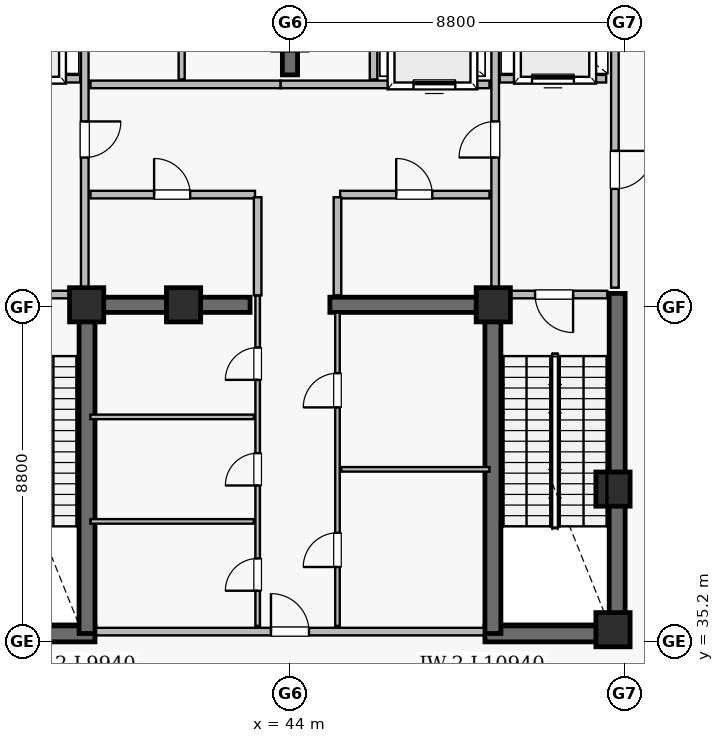
"""IFC4 building model, lengths in metres.
Left out: names, types, materials, properties, quantities, classifications, styles, units other than length and angle.
Written with IfcOpenShell. Run it as: python <this file> out.ifc"""

import sys

from ifc_helpers import new_model, si_unit, direction, frame, frame_2d, origin, origin_2d, place, context, subcontext, project, spatial, rectangle, extrude, element, fill, save


model = new_model("IFC4")
c1 = context("Model", 3, precision=1e-05, world=origin(), true_north=direction((0.0, 1.0)))
c2 = subcontext(c1, "Body", "Model", "MODEL_VIEW")
j1 = project(units=[si_unit("LENGTHUNIT", "METRE"), si_unit("PLANEANGLEUNIT", "RADIAN")], contexts=[c1])
p1 = place(None, origin())
s1 = spatial("IfcSite", under=j1, at=p1, CompositionType="ELEMENT")
p2 = place(p1, origin())
s2 = spatial("IfcBuilding", under=s1, at=p2, CompositionType="ELEMENT")
p3 = place(p2, frame((0.0, 0.0, 300.8)))
s3 = spatial("IfcBuildingStorey", under=s2, at=p3, CompositionType="ELEMENT", Elevation=300.8)
for number, where, z_axis, x_axis in (
    (1, (35.18, 35.39, 0.0), (0.0, 0.0, 1.0), (1.0, 0.0, 0.0)),
    (2, (49.13, 35.39, 0.0), (0.0, 0.0, 1.0), (1.0, 0.0, 0.0)),
):
    element("IfcWall", number, at=place(p3, frame(where, z_axis=z_axis, x_axis=x_axis)), inside=s3, PredefinedType="SHEAR", context=c2, shape_type="SweptSolid", body=[
        extrude(rectangle(XDim=3.69, YDim=0.42, at=frame_2d((1.845, 0.0))), origin(), (0.0, 0.0, 1.0), 5.74),
    ])
p4 = place(p3, frame((52.61, 35.18, 0.0), z_axis=(0.0, 0.0, 1.0), x_axis=(0.0, 1.0, 0.0)))
e3 = element("IfcWall", 3, at=p4, inside=s3, PredefinedType="SHEAR", context=c2, shape_type="SweptSolid", body=[
    extrude(rectangle(XDim=9.17, YDim=0.42, at=frame_2d((4.585, 0.0))), origin(), (0.0, 0.0, 1.0), 5.74),
])
for number, where, z_axis, x_axis in (
    (4, (38.66, 35.4, 0.0), (0.0, 0.0, 1.0), (0.0, 1.0, 0.0)),
    (5, (49.34, 35.4, 0.0), (0.0, 0.0, 1.0), (0.0, 1.0, 0.0)),
):
    element("IfcWall", number, at=place(p3, frame(where, z_axis=z_axis, x_axis=x_axis)), inside=s3, PredefinedType="SHEAR", context=c2, shape_type="SweptSolid", body=[
        extrude(rectangle(XDim=8.95, YDim=0.42, at=frame_2d((4.475, 0.0))), origin(), (0.0, 0.0, 1.0), 5.74),
    ])
p5 = place(p3, frame((44.0, 50.1, 0.0), z_axis=(0.0, 0.0, 1.0), x_axis=(0.0, 1.0, 0.0)))
e6 = element("IfcWall", 6, at=p5, inside=s3, PredefinedType="SHEAR", context=c2, shape_type="SweptSolid", body=[
    extrude(rectangle(XDim=2.1, YDim=0.4, at=frame_2d((1.05, 0.0))), origin(), (0.0, 0.0, 1.0), 5.74),
])
for number, where, z_axis, x_axis in (
    (7, (38.75, 44.05, 0.0), (0.0, 0.0, 1.0), (1.0, 0.0, 0.0)),
    (8, (45.05, 44.05, 0.0), (0.0, 0.0, 1.0), (1.0, 0.0, 0.0)),
):
    element("IfcWall", number, at=place(p3, frame(where, z_axis=z_axis, x_axis=x_axis)), inside=s3, PredefinedType="SHEAR", context=c2, shape_type="SweptSolid", body=[
        extrude(rectangle(XDim=4.2, YDim=0.4, at=frame_2d((2.1, 0.0))), origin(), (0.0, 0.0, 1.0), 5.74),
    ])
for number, where, z_axis, x_axis in (
    (9, (38.65, 44.05, 0.0), (0.0, 0.0, 1.0), (1.0, 0.0, 0.0)),
    (10, (52.5, 35.5, 0.0), (0.0, 0.0, 1.0), (1.0, 0.0, 0.0)),
    (11, (52.5, 39.2, 0.0), (0.0, 0.0, 1.0), (1.0, 0.0, 0.0)),
    (12, (49.35, 44.05, 0.0), (0.0, 0.0, 1.0), (1.0, 0.0, 0.0)),
    (13, (41.2, 44.05, 0.0), (0.0, 0.0, 1.0), (1.0, 0.0, 0.0)),
):
    element("IfcColumn", number, at=place(p3, frame(where, z_axis=z_axis, x_axis=x_axis)), inside=s3, PredefinedType="COLUMN", context=c2, shape_type="SweptSolid", body=[
        extrude(rectangle(XDim=0.9, YDim=0.9, at=origin_2d()), origin(), (0.0, 0.0, 1.0), 6.0),
    ])
p6 = place(p3, frame((38.9, 35.45, 0.0), z_axis=(0.0, 0.0, 1.0), x_axis=(1.0, 0.0, 0.0)))
e14 = element("IfcWall", 14, at=p6, inside=s3, PredefinedType="SOLIDWALL", context=c2, shape_type="SweptSolid", body=[
    extrude(rectangle(XDim=10.2, YDim=0.2, at=frame_2d((5.1, 0.0))), origin(), (0.0, 0.0, 1.0), 5.74),
])
p7 = place(p6, frame((4.6, 0.0, 0.0)))
e15 = element("IfcOpeningElement", 15, at=p7, cuts=e14, PredefinedType="OPENING", context=c2, shape_type="SweptSolid", body=[
    extrude(rectangle(XDim=1.0, YDim=2.15, at=frame_2d((0.5, 1.075))), frame((0.0, 0.11, 0.0), z_axis=(0.0, -1.0, 0.0), x_axis=(1.0, 0.0, 0.0)), (0.0, 0.0, 1.0), 0.22),
])
p8 = place(p3, frame((43.15, 35.6, 0.0), z_axis=(0.0, 0.0, 1.0), x_axis=(0.0, 1.0, 0.0)))
e16 = element("IfcWall", 16, at=p8, inside=s3, PredefinedType="PARTITIONING", context=c2, shape_type="SweptSolid", body=[
    extrude(rectangle(XDim=8.7, YDim=0.12, at=frame_2d((4.35, 0.0))), origin(), (0.0, 0.0, 1.0), 5.74),
])
p9 = place(p8, frame((0.925, 0.0, 0.0)))
e17 = element("IfcOpeningElement", 17, at=p9, cuts=e16, PredefinedType="OPENING", context=c2, shape_type="SweptSolid", body=[
    extrude(rectangle(XDim=0.85, YDim=2.1, at=frame_2d((0.425, 1.05))), frame((0.0, 0.07, 0.0), z_axis=(0.0, -1.0, 0.0), x_axis=(1.0, 0.0, 0.0)), (0.0, 0.0, 1.0), 0.14),
])
p10 = place(p8, frame((3.695, 0.0, 0.0)))
e18 = element("IfcOpeningElement", 18, at=p10, cuts=e16, PredefinedType="OPENING", context=c2, shape_type="SweptSolid", body=[
    extrude(rectangle(XDim=0.85, YDim=2.1, at=frame_2d((0.425, 1.05))), frame((0.0, 0.07, 0.0), z_axis=(0.0, -1.0, 0.0), x_axis=(1.0, 0.0, 0.0)), (0.0, 0.0, 1.0), 0.14),
])
p11 = place(p8, frame((6.475, 0.0, 0.0)))
e19 = element("IfcOpeningElement", 19, at=p11, cuts=e16, PredefinedType="OPENING", context=c2, shape_type="SweptSolid", body=[
    extrude(rectangle(XDim=0.85, YDim=2.1, at=frame_2d((0.425, 1.05))), frame((0.0, 0.07, 0.0), z_axis=(0.0, -1.0, 0.0), x_axis=(1.0, 0.0, 0.0)), (0.0, 0.0, 1.0), 0.14),
])
p12 = place(p3, frame((45.25, 35.6, 0.0), z_axis=(0.0, 0.0, 1.0), x_axis=(0.0, 1.0, 0.0)))
e20 = element("IfcWall", 20, at=p12, inside=s3, PredefinedType="PARTITIONING", context=c2, shape_type="SweptSolid", body=[
    extrude(rectangle(XDim=8.25, YDim=0.12, at=frame_2d((4.125, 0.0))), origin(), (0.0, 0.0, 1.0), 5.74),
])
p13 = place(p12, frame((1.55, 0.0, 0.0)))
e21 = element("IfcOpeningElement", 21, at=p13, cuts=e20, PredefinedType="OPENING", context=c2, shape_type="SweptSolid", body=[
    extrude(rectangle(XDim=0.9, YDim=2.1, at=frame_2d((0.45, 1.05))), frame((0.0, 0.07, 0.0), z_axis=(0.0, -1.0, 0.0), x_axis=(1.0, 0.0, 0.0)), (0.0, 0.0, 1.0), 0.14),
])
p14 = place(p12, frame((5.75, 0.0, 0.0)))
e22 = element("IfcOpeningElement", 22, at=p14, cuts=e20, PredefinedType="OPENING", context=c2, shape_type="SweptSolid", body=[
    extrude(rectangle(XDim=0.9, YDim=2.1, at=frame_2d((0.45, 1.05))), frame((0.0, 0.07, 0.0), z_axis=(0.0, -1.0, 0.0), x_axis=(1.0, 0.0, 0.0)), (0.0, 0.0, 1.0), 0.14),
])
p15 = place(p3, frame((52.55, 44.5, 0.0), z_axis=(0.0, 0.0, 1.0), x_axis=(0.0, 1.0, 0.0)))
e23 = element("IfcWall", 23, at=p15, inside=s3, PredefinedType="SOLIDWALL", context=c2, shape_type="SweptSolid", body=[
    extrude(rectangle(XDim=7.92, YDim=0.2, at=frame_2d((3.96, 0.0))), origin(), (0.0, 0.0, 1.0), 5.74),
])
p16 = place(p15, frame((2.6, 0.0, 0.0)))
e24 = element("IfcOpeningElement", 24, at=p16, cuts=e23, PredefinedType="OPENING", context=c2, shape_type="SweptSolid", body=[
    extrude(rectangle(XDim=1.0, YDim=2.15, at=frame_2d((0.5, 1.075))), frame((0.0, 0.11, 0.0), z_axis=(0.0, -1.0, 0.0), x_axis=(1.0, 0.0, 0.0)), (0.0, 0.0, 1.0), 0.22),
])
p17 = place(p3, frame((38.6, 44.5, 0.0), z_axis=(0.0, 0.0, 1.0), x_axis=(0.0, 1.0, 0.0)))
e25 = element("IfcWall", 25, at=p17, inside=s3, PredefinedType="SOLIDWALL", context=c2, shape_type="SweptSolid", body=[
    extrude(rectangle(XDim=7.92, YDim=0.2, at=frame_2d((3.96, 0.0))), origin(), (0.0, 0.0, 1.0), 5.74),
])
p18 = place(p17, frame((3.425, 0.0, 0.0)))
e26 = element("IfcOpeningElement", 26, at=p18, cuts=e25, PredefinedType="OPENING", context=c2, shape_type="SweptSolid", body=[
    extrude(rectangle(XDim=0.95, YDim=2.15, at=frame_2d((0.475, 1.075))), frame((0.0, 0.11, 0.0), z_axis=(0.0, -1.0, 0.0), x_axis=(1.0, 0.0, 0.0)), (0.0, 0.0, 1.0), 0.22),
])
p19 = place(p3, frame((49.4, 44.5, 0.0), z_axis=(0.0, 0.0, 1.0), x_axis=(0.0, 1.0, 0.0)))
e27 = element("IfcWall", 27, at=p19, inside=s3, PredefinedType="SOLIDWALL", context=c2, shape_type="SweptSolid", body=[
    extrude(rectangle(XDim=7.92, YDim=0.2, at=frame_2d((3.96, 0.0))), origin(), (0.0, 0.0, 1.0), 4.828),
])
p20 = place(p19, frame((3.425, 0.0, 0.0)))
e28 = element("IfcOpeningElement", 28, at=p20, cuts=e27, PredefinedType="OPENING", context=c2, shape_type="SweptSolid", body=[
    extrude(rectangle(XDim=0.95, YDim=2.15, at=frame_2d((0.475, 1.075))), frame((0.0, 0.11, 0.0), z_axis=(0.0, -1.0, 0.0), x_axis=(1.0, 0.0, 0.0)), (0.0, 0.0, 1.0), 0.22),
])
p21 = place(p3, frame((43.75, 49.85, 0.0), z_axis=(0.0, 0.0, 1.0), x_axis=(1.0, 0.0, 0.0)))
e29 = element("IfcWall", 29, at=p21, inside=s3, PredefinedType="SOLIDWALL", context=c2, shape_type="SweptSolid", body=[
    extrude(rectangle(XDim=5.5, YDim=0.2, at=frame_2d((2.75, 0.0))), origin(), (0.0, 0.0, 1.0), 4.828),
])
p22 = place(p21, frame((3.5, 0.0, 0.0)))
e30 = element("IfcOpeningElement", 30, at=p22, cuts=e29, PredefinedType="OPENING", context=c2, shape_type="SweptSolid", body=[
    extrude(rectangle(XDim=1.1, YDim=2.15, at=frame_2d((0.55, 1.075))), frame((0.0, 0.11, 0.0), z_axis=(0.0, -1.0, 0.0), x_axis=(1.0, 0.0, 0.0)), (0.0, 0.0, 1.0), 0.22),
])
p23 = place(p3, frame((38.75, 46.95, 0.0), z_axis=(0.0, 0.0, 1.0), x_axis=(1.0, 0.0, 0.0)))
e31 = element("IfcWall", 31, at=p23, inside=s3, PredefinedType="SOLIDWALL", context=c2, shape_type="SweptSolid", body=[
    extrude(rectangle(XDim=4.33, YDim=0.2, at=frame_2d((2.165, 0.0))), origin(), (0.0, 0.0, 1.0), 5.74),
])
p24 = place(p23, frame((1.675, 0.0, 0.0)))
e32 = element("IfcOpeningElement", 32, at=p24, cuts=e31, PredefinedType="OPENING", context=c2, shape_type="SweptSolid", body=[
    extrude(rectangle(XDim=0.95, YDim=2.1, at=frame_2d((0.475, 1.05))), frame((0.0, 0.11, 0.0), z_axis=(0.0, -1.0, 0.0), x_axis=(1.0, 0.0, 0.0)), (0.0, 0.0, 1.0), 0.22),
])
p25 = place(p3, frame((45.32, 46.95, 0.0), z_axis=(0.0, 0.0, 1.0), x_axis=(1.0, 0.0, 0.0)))
e33 = element("IfcWall", 33, at=p25, inside=s3, PredefinedType="SOLIDWALL", context=c2, shape_type="SweptSolid", body=[
    extrude(rectangle(XDim=3.93, YDim=0.2, at=frame_2d((1.965, 0.0))), origin(), (0.0, 0.0, 1.0), 4.828),
])
p26 = place(p25, frame((1.475, 0.0, 0.0)))
e34 = element("IfcOpeningElement", 34, at=p26, cuts=e33, PredefinedType="OPENING", context=c2, shape_type="SweptSolid", body=[
    extrude(rectangle(XDim=0.95, YDim=2.1, at=frame_2d((0.475, 1.05))), frame((0.0, 0.11, 0.0), z_axis=(0.0, -1.0, 0.0), x_axis=(1.0, 0.0, 0.0)), (0.0, 0.0, 1.0), 0.22),
])
p27 = place(p3, frame((35.65, 44.32, 0.0), z_axis=(0.0, 0.0, 1.0), x_axis=(1.0, 0.0, 0.0)))
e35 = element("IfcWall", 35, at=p27, inside=s3, PredefinedType="SOLIDWALL", context=c2, shape_type="SweptSolid", body=[
    extrude(rectangle(XDim=2.8, YDim=0.2, at=frame_2d((1.4, 0.0))), origin(), (0.0, 0.0, 1.0), 5.74),
])
p28 = place(p27, frame((0.9, 0.0, 0.0)))
e36 = element("IfcOpeningElement", 36, at=p28, cuts=e35, PredefinedType="OPENING", context=c2, shape_type="SweptSolid", body=[
    extrude(rectangle(XDim=1.0, YDim=2.15, at=frame_2d((0.5, 1.075))), frame((0.0, 0.11, 0.0), z_axis=(0.0, -1.0, 0.0), x_axis=(1.0, 0.0, 0.0)), (0.0, 0.0, 1.0), 0.22),
])
p29 = place(p3, frame((49.55, 44.32, 0.0), z_axis=(0.0, 0.0, 1.0), x_axis=(1.0, 0.0, 0.0)))
e37 = element("IfcWall", 37, at=p29, inside=s3, PredefinedType="SOLIDWALL", context=c2, shape_type="SweptSolid", body=[
    extrude(rectangle(XDim=2.8, YDim=0.2, at=frame_2d((1.4, 0.0))), origin(), (0.0, 0.0, 1.0), 4.828),
])
p30 = place(p29, frame((0.9, 0.0, 0.0)))
e38 = element("IfcOpeningElement", 38, at=p30, cuts=e37, PredefinedType="OPENING", context=c2, shape_type="SweptSolid", body=[
    extrude(rectangle(XDim=1.0, YDim=2.15, at=frame_2d((0.5, 1.075))), frame((0.0, 0.11, 0.0), z_axis=(0.0, -1.0, 0.0), x_axis=(1.0, 0.0, 0.0)), (0.0, 0.0, 1.0), 0.22),
])
p31 = place(p3, frame((35.68, 50.0, 0.0), z_axis=(0.0, 0.0, 1.0), x_axis=(1.0, 0.0, 0.0)))
e39 = element("IfcWall", 39, at=p31, inside=s3, PredefinedType="SOLIDWALL", context=c2, shape_type="SweptSolid", body=[
    extrude(rectangle(XDim=2.8, YDim=0.2, at=frame_2d((1.4, 0.0))), origin(), (0.0, 0.0, 1.0), 5.74),
])
p32 = place(p31, frame((0.85, 0.0, 0.0)))
e40 = element("IfcOpeningElement", 40, at=p32, cuts=e39, PredefinedType="OPENING", context=c2, shape_type="SweptSolid", body=[
    extrude(rectangle(XDim=1.1, YDim=2.15, at=frame_2d((0.55, 1.075))), frame((0.0, 0.11, 0.0), z_axis=(0.0, -1.0, 0.0), x_axis=(1.0, 0.0, 0.0)), (0.0, 0.0, 1.0), 0.22),
])
p33 = place(p3, frame((49.52, 50.0, 0.0), z_axis=(0.0, 0.0, 1.0), x_axis=(1.0, 0.0, 0.0)))
e41 = element("IfcWall", 41, at=p33, inside=s3, PredefinedType="SOLIDWALL", context=c2, shape_type="SweptSolid", body=[
    extrude(rectangle(XDim=2.8, YDim=0.2, at=frame_2d((1.4, 0.0))), origin(), (0.0, 0.0, 1.0), 5.74),
])
p34 = place(p33, frame((0.85, 0.0, 0.0)))
e42 = element("IfcOpeningElement", 42, at=p34, cuts=e41, PredefinedType="OPENING", context=c2, shape_type="SweptSolid", body=[
    extrude(rectangle(XDim=1.1, YDim=2.15, at=frame_2d((0.55, 1.075))), frame((0.0, 0.11, 0.0), z_axis=(0.0, -1.0, 0.0), x_axis=(1.0, 0.0, 0.0)), (0.0, 0.0, 1.0), 0.22),
])
p35 = place(p3, frame((38.75, 49.85, 0.0), z_axis=(0.0, 0.0, 1.0), x_axis=(1.0, 0.0, 0.0)))
e43 = element("IfcWall", 43, at=p35, inside=s3, PredefinedType="SOLIDWALL", context=c2, shape_type="SweptSolid", body=[
    extrude(rectangle(XDim=5.0, YDim=0.2, at=frame_2d((2.5, 0.0))), origin(), (0.0, 0.0, 1.0), 5.74),
])
for number, where, z_axis, x_axis in (
    (44, (38.75, 38.35, 0.0), (0.0, 0.0, 1.0), (1.0, 0.0, 0.0)),
    (45, (38.75, 41.1, 0.0), (0.0, 0.0, 1.0), (1.0, 0.0, 0.0)),
):
    element("IfcWall", number, at=place(p3, frame(where, z_axis=z_axis, x_axis=x_axis)), inside=s3, PredefinedType="PARTITIONING", context=c2, shape_type="SweptSolid", body=[
        extrude(rectangle(XDim=4.3, YDim=0.12, at=frame_2d((2.15, 0.0))), origin(), (0.0, 0.0, 1.0), 5.74),
    ])
p36 = place(p3, frame((45.35, 39.72, 0.0), z_axis=(0.0, 0.0, 1.0), x_axis=(1.0, 0.0, 0.0)))
e46 = element("IfcWall", 46, at=p36, inside=s3, PredefinedType="PARTITIONING", context=c2, shape_type="SweptSolid", body=[
    extrude(rectangle(XDim=3.9, YDim=0.12, at=frame_2d((1.95, 0.0))), origin(), (0.0, 0.0, 1.0), 5.74),
])
for number, where, z_axis, x_axis in (
    (47, (43.15, 44.3, 0.0), (0.0, 0.0, 1.0), (0.0, 1.0, 0.0)),
    (48, (45.25, 44.3, 0.0), (0.0, 0.0, 1.0), (0.0, 1.0, 0.0)),
):
    element("IfcWall", number, at=place(p3, frame(where, z_axis=z_axis, x_axis=x_axis)), inside=s3, PredefinedType="SOLIDWALL", context=c2, shape_type="SweptSolid", body=[
        extrude(rectangle(XDim=2.58, YDim=0.2, at=frame_2d((1.29, 0.0))), origin(), (0.0, 0.0, 1.0), 5.74),
    ])
p37 = place(p3, frame((41.15, 49.98, 0.0), z_axis=(0.0, 0.0, 1.0), x_axis=(0.0, 1.0, 0.0)))
e49 = element("IfcWall", 49, at=p37, inside=s3, PredefinedType="SOLIDWALL", context=c2, shape_type="SweptSolid", body=[
    extrude(rectangle(XDim=2.37, YDim=0.16, at=frame_2d((1.185, 0.0))), origin(), (0.0, 0.0, 1.0), 5.74),
])
p38 = place(p3, frame((46.2, 49.98, 0.0), z_axis=(0.0, 0.0, 1.0), x_axis=(0.0, 1.0, 0.0)))
e50 = element("IfcWall", 50, at=p38, inside=s3, PredefinedType="SOLIDWALL", context=c2, shape_type="SweptSolid", body=[
    extrude(rectangle(XDim=2.37, YDim=0.2, at=frame_2d((1.185, 0.0))), origin(), (0.0, 0.0, 1.0), 5.74),
])
p39 = place(p30, frame((1.0, 0.0, 0.0), z_axis=(0.0, 0.0, 1.0), x_axis=(-1.0, 0.0, 0.0)))
e51 = element("IfcDoor", 51, at=p39, inside=s3, OperationType="SINGLE_SWING_RIGHT", PredefinedType="DOOR", context=c2, shape_type="SweptSolid", body=[
    extrude(rectangle(XDim=1.0, YDim=2.15, at=frame_2d((0.5, 1.075))), frame((0.0, 0.025, 0.0), z_axis=(0.0, -1.0, 0.0), x_axis=(1.0, 0.0, 0.0)), (0.0, 0.0, 1.0), 0.05),
])
fill(e38, e51)
p40 = place(p16, frame((1.0, 0.0, 0.0), z_axis=(0.0, 0.0, 1.0), x_axis=(-1.0, 0.0, 0.0)))
e52 = element("IfcDoor", 52, at=p40, inside=s3, OperationType="SINGLE_SWING_RIGHT", PredefinedType="DOOR", context=c2, shape_type="SweptSolid", body=[
    extrude(rectangle(XDim=1.0, YDim=2.15, at=frame_2d((0.5, 1.075))), frame((0.0, 0.025, 0.0), z_axis=(0.0, -1.0, 0.0), x_axis=(1.0, 0.0, 0.0)), (0.0, 0.0, 1.0), 0.05),
])
fill(e24, e52)
p41 = place(p18, frame((0.95, 0.0, 0.0), z_axis=(0.0, 0.0, 1.0), x_axis=(-1.0, 0.0, 0.0)))
e53 = element("IfcDoor", 53, at=p41, inside=s3, OperationType="SINGLE_SWING_RIGHT", PredefinedType="DOOR", context=c2, shape_type="SweptSolid", body=[
    extrude(rectangle(XDim=0.95, YDim=2.15, at=frame_2d((0.475, 1.075))), frame((0.0, 0.025, 0.0), z_axis=(0.0, -1.0, 0.0), x_axis=(1.0, 0.0, 0.0)), (0.0, 0.0, 1.0), 0.05),
])
fill(e26, e53)
p42 = place(p20, origin())
e54 = element("IfcDoor", 54, at=p42, inside=s3, OperationType="SINGLE_SWING_LEFT", PredefinedType="DOOR", context=c2, shape_type="SweptSolid", body=[
    extrude(rectangle(XDim=0.95, YDim=2.15, at=frame_2d((0.475, 1.075))), frame((0.0, 0.025, 0.0), z_axis=(0.0, -1.0, 0.0), x_axis=(1.0, 0.0, 0.0)), (0.0, 0.0, 1.0), 0.05),
])
fill(e28, e54)
p43 = place(p34, origin())
e55 = element("IfcDoor", 55, at=p43, inside=s3, OperationType="SLIDING_TO_LEFT", PredefinedType="DOOR", context=c2, shape_type="SweptSolid", body=[
    extrude(rectangle(XDim=1.1, YDim=2.15, at=frame_2d((0.55, 1.075))), frame((0.0, 0.025, 0.0), z_axis=(0.0, -1.0, 0.0), x_axis=(1.0, 0.0, 0.0)), (0.0, 0.0, 1.0), 0.05),
])
fill(e42, e55)
p44 = place(p7, origin())
e56 = element("IfcDoor", 56, at=p44, inside=s3, OperationType="SINGLE_SWING_LEFT", PredefinedType="DOOR", context=c2, shape_type="SweptSolid", body=[
    extrude(rectangle(XDim=1.0, YDim=2.15, at=frame_2d((0.5, 1.075))), frame((0.0, 0.025, 0.0), z_axis=(0.0, -1.0, 0.0), x_axis=(1.0, 0.0, 0.0)), (0.0, 0.0, 1.0), 0.05),
])
fill(e15, e56)
p45 = place(p22, origin())
e57 = element("IfcDoor", 57, at=p45, inside=s3, OperationType="SLIDING_TO_LEFT", PredefinedType="DOOR", context=c2, shape_type="SweptSolid", body=[
    extrude(rectangle(XDim=1.1, YDim=2.15, at=frame_2d((0.55, 1.075))), frame((0.0, 0.025, 0.0), z_axis=(0.0, -1.0, 0.0), x_axis=(1.0, 0.0, 0.0)), (0.0, 0.0, 1.0), 0.05),
])
fill(e30, e57)
p46 = place(p24, origin())
e58 = element("IfcDoor", 58, at=p46, inside=s3, OperationType="SINGLE_SWING_LEFT", PredefinedType="DOOR", context=c2, shape_type="SweptSolid", body=[
    extrude(rectangle(XDim=0.95, YDim=2.1, at=frame_2d((0.475, 1.05))), frame((0.0, 0.025, 0.0), z_axis=(0.0, -1.0, 0.0), x_axis=(1.0, 0.0, 0.0)), (0.0, 0.0, 1.0), 0.05),
])
fill(e32, e58)
p47 = place(p26, origin())
e59 = element("IfcDoor", 59, at=p47, inside=s3, OperationType="SINGLE_SWING_LEFT", PredefinedType="DOOR", context=c2, shape_type="SweptSolid", body=[
    extrude(rectangle(XDim=0.95, YDim=2.1, at=frame_2d((0.475, 1.05))), frame((0.0, 0.025, 0.0), z_axis=(0.0, -1.0, 0.0), x_axis=(1.0, 0.0, 0.0)), (0.0, 0.0, 1.0), 0.05),
])
fill(e34, e59)
p48 = place(p9, origin())
e60 = element("IfcDoor", 60, at=p48, inside=s3, OperationType="SINGLE_SWING_LEFT", PredefinedType="DOOR", context=c2, shape_type="SweptSolid", body=[
    extrude(rectangle(XDim=0.85, YDim=2.1, at=frame_2d((0.425, 1.05))), frame((0.0, 0.025, 0.0), z_axis=(0.0, -1.0, 0.0), x_axis=(1.0, 0.0, 0.0)), (0.0, 0.0, 1.0), 0.05),
])
fill(e17, e60)
p49 = place(p10, origin())
e61 = element("IfcDoor", 61, at=p49, inside=s3, OperationType="SINGLE_SWING_LEFT", PredefinedType="DOOR", context=c2, shape_type="SweptSolid", body=[
    extrude(rectangle(XDim=0.85, YDim=2.1, at=frame_2d((0.425, 1.05))), frame((0.0, 0.025, 0.0), z_axis=(0.0, -1.0, 0.0), x_axis=(1.0, 0.0, 0.0)), (0.0, 0.0, 1.0), 0.05),
])
fill(e18, e61)
p50 = place(p11, origin())
e62 = element("IfcDoor", 62, at=p50, inside=s3, OperationType="SINGLE_SWING_LEFT", PredefinedType="DOOR", context=c2, shape_type="SweptSolid", body=[
    extrude(rectangle(XDim=0.85, YDim=2.1, at=frame_2d((0.425, 1.05))), frame((0.0, 0.025, 0.0), z_axis=(0.0, -1.0, 0.0), x_axis=(1.0, 0.0, 0.0)), (0.0, 0.0, 1.0), 0.05),
])
fill(e19, e62)
p51 = place(p13, origin())
e63 = element("IfcDoor", 63, at=p51, inside=s3, OperationType="SINGLE_SWING_LEFT", PredefinedType="DOOR", context=c2, shape_type="SweptSolid", body=[
    extrude(rectangle(XDim=0.9, YDim=2.1, at=frame_2d((0.45, 1.05))), frame((0.0, 0.025, 0.0), z_axis=(0.0, -1.0, 0.0), x_axis=(1.0, 0.0, 0.0)), (0.0, 0.0, 1.0), 0.05),
])
fill(e21, e63)
p52 = place(p14, origin())
e64 = element("IfcDoor", 64, at=p52, inside=s3, OperationType="SINGLE_SWING_LEFT", PredefinedType="DOOR", context=c2, shape_type="SweptSolid", body=[
    extrude(rectangle(XDim=0.9, YDim=2.1, at=frame_2d((0.45, 1.05))), frame((0.0, 0.025, 0.0), z_axis=(0.0, -1.0, 0.0), x_axis=(1.0, 0.0, 0.0)), (0.0, 0.0, 1.0), 0.05),
])
fill(e22, e64)
save(model, sys.argv[1])
